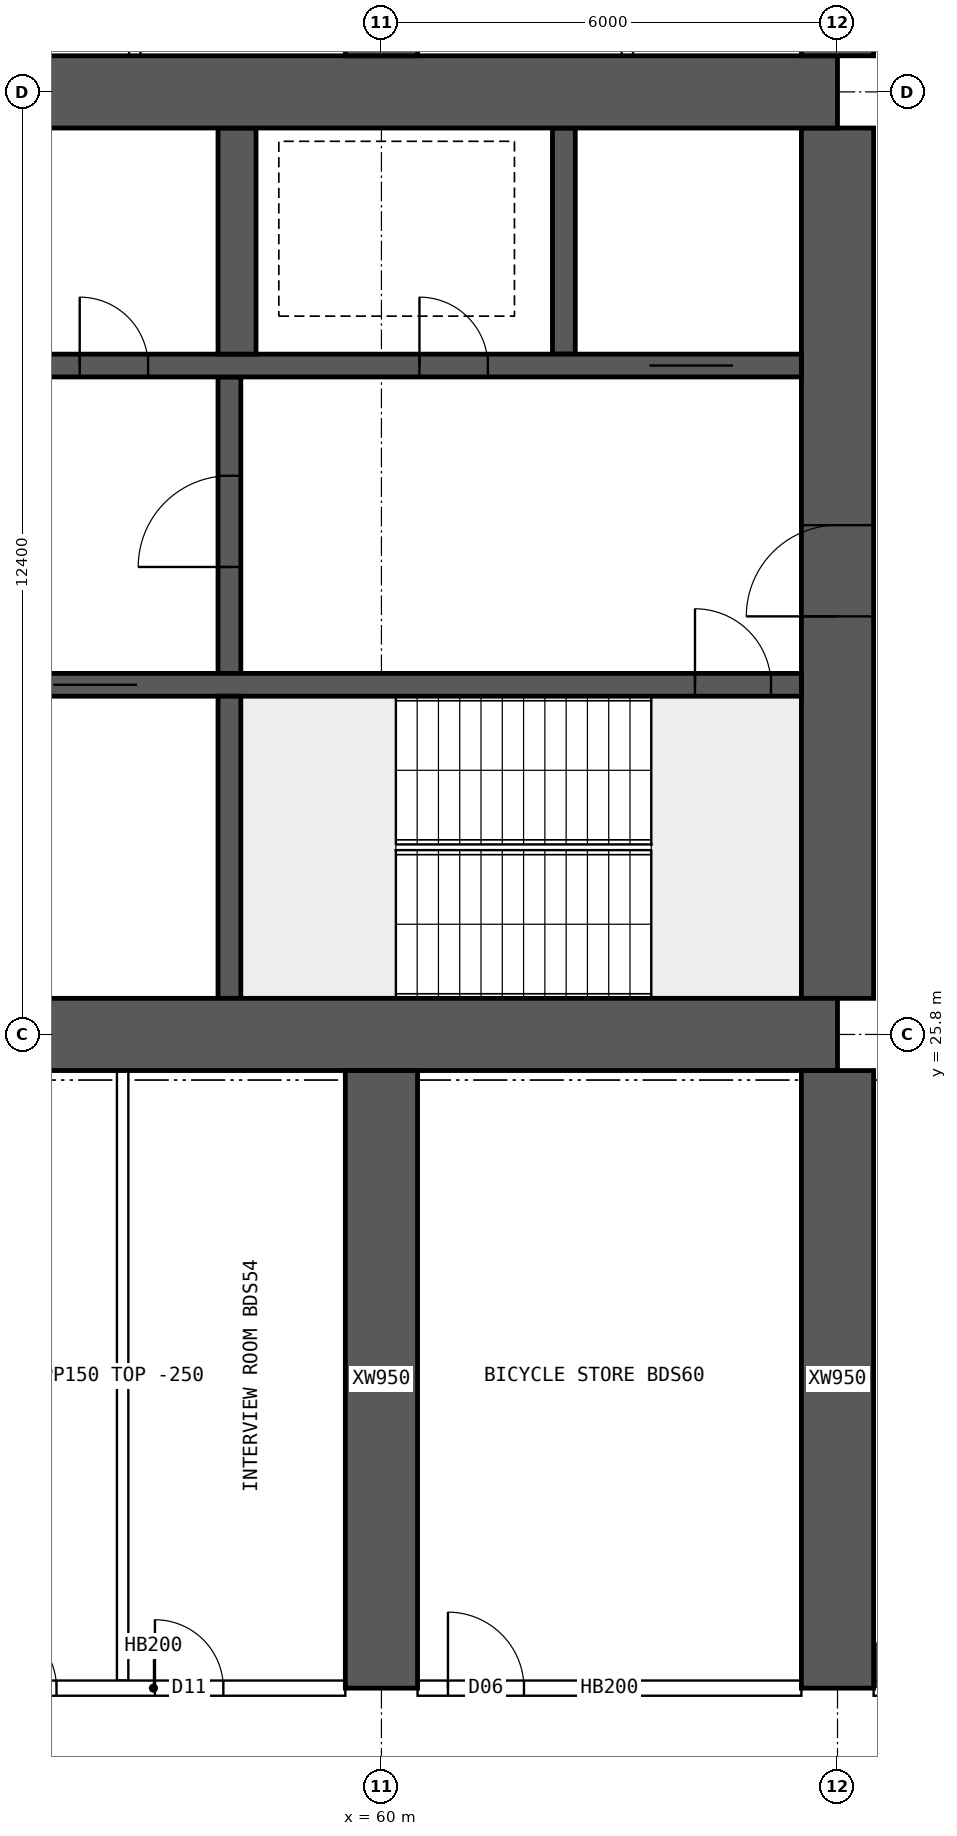
"""IFC4 building model, lengths in metres.
Left out: names, types, materials, properties, quantities, classifications, styles, units other than length and angle.
Written with IfcOpenShell. Run it as: python <this file> out.ifc"""

import sys

from ifc_helpers import new_model, si_unit, direction, frame, frame_2d, origin, place, context, subcontext, project, spatial, rectangle, extrude, element, fill, save


model = new_model("IFC4")
c1 = context("Model", 3, precision=1e-05, world=origin(), true_north=direction((0.0, 1.0)))
c2 = subcontext(c1, "Body", "Model", "MODEL_VIEW")
j1 = project(units=[si_unit("LENGTHUNIT", "METRE"), si_unit("PLANEANGLEUNIT", "RADIAN")], contexts=[c1])
p1 = place(None, origin())
s1 = spatial("IfcSite", under=j1, at=p1, CompositionType="ELEMENT")
p2 = place(p1, origin())
s2 = spatial("IfcBuilding", under=s1, at=p2, CompositionType="ELEMENT")
p3 = place(p2, frame((0.0, 0.0, 140.35)))
s3 = spatial("IfcBuildingStorey", under=s2, at=p3, CompositionType="ELEMENT", Elevation=140.35)
for number, where, z_axis, x_axis in (
    (1, (18.0, 25.8, 0.0), (0.0, 0.0, 1.0), (1.0, 0.0, 0.0)),
    (2, (18.0, 38.2, 0.0), (0.0, 0.0, 1.0), (1.0, 0.0, 0.0)),
):
    element("IfcWall", number, at=place(p3, frame(where, z_axis=z_axis, x_axis=x_axis)), inside=s3, PredefinedType="SHEAR", context=c2, shape_type="SweptSolid", body=[
        extrude(rectangle(XDim=48.0, YDim=0.95, at=frame_2d((24.0, 0.0))), origin(), (0.0, 0.0, 1.0), 4.5),
    ])
p4 = place(p3, frame((66.0, 26.275, 0.0), z_axis=(0.0, 0.0, 1.0), x_axis=(0.0, 1.0, 0.0)))
e3 = element("IfcWall", 3, at=p4, inside=s3, PredefinedType="SHEAR", context=c2, shape_type="SweptSolid", body=[
    extrude(rectangle(XDim=11.45, YDim=0.95, at=frame_2d((5.725, 0.0))), origin(), (0.0, 0.0, 1.0), 4.5),
])
p5 = place(p4, frame((5.025, 0.0, 0.0)))
e4 = element("IfcOpeningElement", 4, at=p5, cuts=e3, PredefinedType="OPENING", context=c2, shape_type="SweptSolid", body=[
    extrude(rectangle(XDim=1.2, YDim=2.1, at=frame_2d((0.6, 1.05))), frame((0.0, 0.485, 0.0), z_axis=(0.0, -1.0, 0.0), x_axis=(1.0, 0.0, 0.0)), (0.0, 0.0, 1.0), 0.97),
])
p6 = place(p3, frame((18.475, 30.4, 0.0), z_axis=(0.0, 0.0, 1.0), x_axis=(1.0, 0.0, 0.0)))
e5 = element("IfcWall", 5, at=p6, inside=s3, PredefinedType="SHEAR", context=c2, shape_type="SweptSolid", body=[
    extrude(rectangle(XDim=47.05, YDim=0.3, at=frame_2d((23.525, 0.0))), origin(), (0.0, 0.0, 1.0), 4.5),
])
p7 = place(p6, frame((0.4, 0.0, 0.0)))
e6 = element("IfcOpeningElement", 6, at=p7, cuts=e5, PredefinedType="OPENING", context=c2, shape_type="SweptSolid", body=[
    extrude(rectangle(XDim=1.0, YDim=2.1, at=frame_2d((0.5, 1.05))), frame((0.0, 0.16, 0.0), z_axis=(0.0, -1.0, 0.0), x_axis=(1.0, 0.0, 0.0)), (0.0, 0.0, 1.0), 0.32),
])
p8 = place(p6, frame((45.65, 0.0, 0.0)))
e7 = element("IfcOpeningElement", 7, at=p8, cuts=e5, PredefinedType="OPENING", context=c2, shape_type="SweptSolid", body=[
    extrude(rectangle(XDim=1.0, YDim=2.1, at=frame_2d((0.5, 1.05))), frame((0.0, 0.16, 0.0), z_axis=(0.0, -1.0, 0.0), x_axis=(1.0, 0.0, 0.0)), (0.0, 0.0, 1.0), 0.32),
])
p9 = place(p6, frame((8.275, 0.0, 0.0)))
e8 = element("IfcOpeningElement", 8, at=p9, cuts=e5, PredefinedType="OPENING", context=c2, shape_type="SweptSolid", body=[
    extrude(rectangle(XDim=1.1, YDim=2.1, at=frame_2d((0.55, 1.05))), frame((0.0, 0.16, 0.0), z_axis=(0.0, -1.0, 0.0), x_axis=(1.0, 0.0, 0.0)), (0.0, 0.0, 1.0), 0.32),
])
p10 = place(p6, frame((10.875, 0.0, 0.0)))
e9 = element("IfcOpeningElement", 9, at=p10, cuts=e5, PredefinedType="OPENING", context=c2, shape_type="SweptSolid", body=[
    extrude(rectangle(XDim=1.1, YDim=2.1, at=frame_2d((0.55, 1.05))), frame((0.0, 0.16, 0.0), z_axis=(0.0, -1.0, 0.0), x_axis=(1.0, 0.0, 0.0)), (0.0, 0.0, 1.0), 0.32),
])
p11 = place(p6, frame((13.475, 0.0, 0.0)))
e10 = element("IfcOpeningElement", 10, at=p11, cuts=e5, PredefinedType="OPENING", context=c2, shape_type="SweptSolid", body=[
    extrude(rectangle(XDim=1.1, YDim=2.1, at=frame_2d((0.55, 1.05))), frame((0.0, 0.16, 0.0), z_axis=(0.0, -1.0, 0.0), x_axis=(1.0, 0.0, 0.0)), (0.0, 0.0, 1.0), 0.32),
])
p12 = place(p6, frame((16.075, 0.0, 0.0)))
e11 = element("IfcOpeningElement", 11, at=p12, cuts=e5, PredefinedType="OPENING", context=c2, shape_type="SweptSolid", body=[
    extrude(rectangle(XDim=1.1, YDim=2.1, at=frame_2d((0.55, 1.05))), frame((0.0, 0.16, 0.0), z_axis=(0.0, -1.0, 0.0), x_axis=(1.0, 0.0, 0.0)), (0.0, 0.0, 1.0), 0.32),
])
p13 = place(p6, frame((18.85, 0.0, 0.0)))
e12 = element("IfcOpeningElement", 12, at=p13, cuts=e5, PredefinedType="OPENING", context=c2, shape_type="SweptSolid", body=[
    extrude(rectangle(XDim=0.9, YDim=2.1, at=frame_2d((0.45, 1.05))), frame((0.0, 0.16, 0.0), z_axis=(0.0, -1.0, 0.0), x_axis=(1.0, 0.0, 0.0)), (0.0, 0.0, 1.0), 0.32),
])
p14 = place(p6, frame((21.5, 0.0, 0.0)))
e13 = element("IfcOpeningElement", 13, at=p14, cuts=e5, PredefinedType="OPENING", context=c2, shape_type="SweptSolid", body=[
    extrude(rectangle(XDim=1.1, YDim=2.1, at=frame_2d((0.55, 1.05))), frame((0.0, 0.16, 0.0), z_axis=(0.0, -1.0, 0.0), x_axis=(1.0, 0.0, 0.0)), (0.0, 0.0, 1.0), 0.32),
])
p15 = place(p6, frame((30.142, 0.0, 0.0)))
e14 = element("IfcOpeningElement", 14, at=p15, cuts=e5, PredefinedType="OPENING", context=c2, shape_type="SweptSolid", body=[
    extrude(rectangle(XDim=1.1, YDim=2.1, at=frame_2d((0.55, 1.05))), frame((0.0, 0.16, 0.0), z_axis=(0.0, -1.0, 0.0), x_axis=(1.0, 0.0, 0.0)), (0.0, 0.0, 1.0), 0.32),
])
p16 = place(p6, frame((33.675, 0.0, 0.0)))
e15 = element("IfcOpeningElement", 15, at=p16, cuts=e5, PredefinedType="OPENING", context=c2, shape_type="SweptSolid", body=[
    extrude(rectangle(XDim=1.1, YDim=2.1, at=frame_2d((0.55, 1.05))), frame((0.0, 0.16, 0.0), z_axis=(0.0, -1.0, 0.0), x_axis=(1.0, 0.0, 0.0)), (0.0, 0.0, 1.0), 0.32),
])
p17 = place(p6, frame((37.208, 0.0, 0.0)))
e16 = element("IfcOpeningElement", 16, at=p17, cuts=e5, PredefinedType="OPENING", context=c2, shape_type="SweptSolid", body=[
    extrude(rectangle(XDim=1.1, YDim=2.1, at=frame_2d((0.55, 1.05))), frame((0.0, 0.16, 0.0), z_axis=(0.0, -1.0, 0.0), x_axis=(1.0, 0.0, 0.0)), (0.0, 0.0, 1.0), 0.32),
])
p18 = place(p3, frame((18.475, 34.6, 0.0), z_axis=(0.0, 0.0, 1.0), x_axis=(1.0, 0.0, 0.0)))
e17 = element("IfcWall", 17, at=p18, inside=s3, PredefinedType="SHEAR", context=c2, shape_type="SweptSolid", body=[
    extrude(rectangle(XDim=47.05, YDim=0.3, at=frame_2d((23.525, 0.0))), origin(), (0.0, 0.0, 1.0), 4.5),
])
p19 = place(p18, frame((0.9, 0.0, 0.0)))
e18 = element("IfcOpeningElement", 18, at=p19, cuts=e17, PredefinedType="OPENING", context=c2, shape_type="SweptSolid", body=[
    extrude(rectangle(XDim=1.1, YDim=2.1, at=frame_2d((0.55, 1.05))), frame((0.0, 0.16, 0.0), z_axis=(0.0, -1.0, 0.0), x_axis=(1.0, 0.0, 0.0)), (0.0, 0.0, 1.0), 0.32),
])
p20 = place(p18, frame((45.05, 0.0, 0.0)))
e19 = element("IfcOpeningElement", 19, at=p20, cuts=e17, PredefinedType="OPENING", context=c2, shape_type="SweptSolid", body=[
    extrude(rectangle(XDim=1.1, YDim=2.1, at=frame_2d((0.55, 1.05))), frame((0.0, 0.16, 0.0), z_axis=(0.0, -1.0, 0.0), x_axis=(1.0, 0.0, 0.0)), (0.0, 0.0, 1.0), 0.32),
])
p21 = place(p18, frame((4.125, 0.0, 0.0)))
e20 = element("IfcOpeningElement", 20, at=p21, cuts=e17, PredefinedType="OPENING", context=c2, shape_type="SweptSolid", body=[
    extrude(rectangle(XDim=0.9, YDim=2.1, at=frame_2d((0.45, 1.05))), frame((0.0, 0.16, 0.0), z_axis=(0.0, -1.0, 0.0), x_axis=(1.0, 0.0, 0.0)), (0.0, 0.0, 1.0), 0.32),
])
p22 = place(p18, frame((42.025, 0.0, 0.0)))
e21 = element("IfcOpeningElement", 21, at=p22, cuts=e17, PredefinedType="OPENING", context=c2, shape_type="SweptSolid", body=[
    extrude(rectangle(XDim=0.9, YDim=2.1, at=frame_2d((0.45, 1.05))), frame((0.0, 0.16, 0.0), z_axis=(0.0, -1.0, 0.0), x_axis=(1.0, 0.0, 0.0)), (0.0, 0.0, 1.0), 0.32),
])
p23 = place(p18, frame((8.9, 0.0, 0.0)))
e22 = element("IfcOpeningElement", 22, at=p23, cuts=e17, PredefinedType="OPENING", context=c2, shape_type="SweptSolid", body=[
    extrude(rectangle(XDim=0.9, YDim=2.1, at=frame_2d((0.45, 1.05))), frame((0.0, 0.16, 0.0), z_axis=(0.0, -1.0, 0.0), x_axis=(1.0, 0.0, 0.0)), (0.0, 0.0, 1.0), 0.32),
])
p24 = place(p18, frame((12.874, 0.0, 0.0)))
e23 = element("IfcOpeningElement", 23, at=p24, cuts=e17, PredefinedType="OPENING", context=c2, shape_type="SweptSolid", body=[
    extrude(rectangle(XDim=0.9, YDim=2.1, at=frame_2d((0.45, 1.05))), frame((0.0, 0.16, 0.0), z_axis=(0.0, -1.0, 0.0), x_axis=(1.0, 0.0, 0.0)), (0.0, 0.0, 1.0), 0.32),
])
p25 = place(p18, frame((16.521, 0.0, 0.0)))
e24 = element("IfcOpeningElement", 24, at=p25, cuts=e17, PredefinedType="OPENING", context=c2, shape_type="SweptSolid", body=[
    extrude(rectangle(XDim=0.9, YDim=2.1, at=frame_2d((0.45, 1.05))), frame((0.0, 0.16, 0.0), z_axis=(0.0, -1.0, 0.0), x_axis=(1.0, 0.0, 0.0)), (0.0, 0.0, 1.0), 0.32),
])
p26 = place(p18, frame((20.28, 0.0, 0.0)))
e25 = element("IfcOpeningElement", 25, at=p26, cuts=e17, PredefinedType="OPENING", context=c2, shape_type="SweptSolid", body=[
    extrude(rectangle(XDim=0.9, YDim=2.1, at=frame_2d((0.45, 1.05))), frame((0.0, 0.16, 0.0), z_axis=(0.0, -1.0, 0.0), x_axis=(1.0, 0.0, 0.0)), (0.0, 0.0, 1.0), 0.32),
])
p27 = place(p18, frame((24.686, 0.0, 0.0)))
e26 = element("IfcOpeningElement", 26, at=p27, cuts=e17, PredefinedType="OPENING", context=c2, shape_type="SweptSolid", body=[
    extrude(rectangle(XDim=0.9, YDim=2.1, at=frame_2d((0.45, 1.05))), frame((0.0, 0.16, 0.0), z_axis=(0.0, -1.0, 0.0), x_axis=(1.0, 0.0, 0.0)), (0.0, 0.0, 1.0), 0.32),
])
p28 = place(p18, frame((27.483, 0.0, 0.0)))
e27 = element("IfcOpeningElement", 27, at=p28, cuts=e17, PredefinedType="OPENING", context=c2, shape_type="SweptSolid", body=[
    extrude(rectangle(XDim=0.9, YDim=2.1, at=frame_2d((0.45, 1.05))), frame((0.0, 0.16, 0.0), z_axis=(0.0, -1.0, 0.0), x_axis=(1.0, 0.0, 0.0)), (0.0, 0.0, 1.0), 0.32),
])
p29 = place(p18, frame((30.666, 0.0, 0.0)))
e28 = element("IfcOpeningElement", 28, at=p29, cuts=e17, PredefinedType="OPENING", context=c2, shape_type="SweptSolid", body=[
    extrude(rectangle(XDim=0.9, YDim=2.1, at=frame_2d((0.45, 1.05))), frame((0.0, 0.16, 0.0), z_axis=(0.0, -1.0, 0.0), x_axis=(1.0, 0.0, 0.0)), (0.0, 0.0, 1.0), 0.32),
])
p30 = place(p18, frame((34.617, 0.0, 0.0)))
e29 = element("IfcOpeningElement", 29, at=p30, cuts=e17, PredefinedType="OPENING", context=c2, shape_type="SweptSolid", body=[
    extrude(rectangle(XDim=0.9, YDim=2.1, at=frame_2d((0.45, 1.05))), frame((0.0, 0.16, 0.0), z_axis=(0.0, -1.0, 0.0), x_axis=(1.0, 0.0, 0.0)), (0.0, 0.0, 1.0), 0.32),
])
p31 = place(p18, frame((37.555, 0.0, 0.0)))
e30 = element("IfcOpeningElement", 30, at=p31, cuts=e17, PredefinedType="OPENING", context=c2, shape_type="SweptSolid", body=[
    extrude(rectangle(XDim=0.9, YDim=2.1, at=frame_2d((0.45, 1.05))), frame((0.0, 0.16, 0.0), z_axis=(0.0, -1.0, 0.0), x_axis=(1.0, 0.0, 0.0)), (0.0, 0.0, 1.0), 0.32),
])
p32 = place(p3, frame((58.0, 26.275, 0.0), z_axis=(0.0, 0.0, 1.0), x_axis=(0.0, 1.0, 0.0)))
e31 = element("IfcWall", 31, at=p32, inside=s3, PredefinedType="SHEAR", context=c2, shape_type="SweptSolid", body=[
    extrude(rectangle(XDim=3.975, YDim=0.3, at=frame_2d((1.988, 0.0))), origin(), (0.0, 0.0, 1.0), 4.5),
])
p33 = place(p3, frame((58.0, 30.55, 0.0), z_axis=(0.0, 0.0, 1.0), x_axis=(0.0, 1.0, 0.0)))
e32 = element("IfcWall", 32, at=p33, inside=s3, PredefinedType="SHEAR", context=c2, shape_type="SweptSolid", body=[
    extrude(rectangle(XDim=3.9, YDim=0.3, at=frame_2d((1.95, 0.0))), origin(), (0.0, 0.0, 1.0), 4.5),
])
p34 = place(p33, frame((1.4, 0.0, 0.0)))
e33 = element("IfcOpeningElement", 33, at=p34, cuts=e32, PredefinedType="OPENING", context=c2, shape_type="SweptSolid", body=[
    extrude(rectangle(XDim=1.2, YDim=2.1, at=frame_2d((0.6, 1.05))), frame((0.0, 0.16, 0.0), z_axis=(0.0, -1.0, 0.0), x_axis=(1.0, 0.0, 0.0)), (0.0, 0.0, 1.0), 0.32),
])
p35 = place(p3, frame((62.4, 34.75, 0.0), z_axis=(0.0, 0.0, 1.0), x_axis=(0.0, 1.0, 0.0)))
e34 = element("IfcWall", 34, at=p35, inside=s3, PredefinedType="SHEAR", context=c2, shape_type="SweptSolid", body=[
    extrude(rectangle(XDim=2.975, YDim=0.3, at=frame_2d((1.488, 0.0))), origin(), (0.0, 0.0, 1.0), 4.5),
])
p36 = place(p3, frame((58.1, 34.75, 0.0), z_axis=(0.0, 0.0, 1.0), x_axis=(0.0, 1.0, 0.0)))
e35 = element("IfcWall", 35, at=p36, inside=s3, PredefinedType="SHEAR", context=c2, shape_type="SweptSolid", body=[
    extrude(rectangle(XDim=2.975, YDim=0.5, at=frame_2d((1.488, 0.0))), origin(), (0.0, 0.0, 1.0), 4.5),
])
for number, where, z_axis, x_axis in (
    (36, (60.0, 17.2, 0.0), (0.0, 0.0, 1.0), (0.0, 1.0, 0.0)),
    (37, (60.0, 38.675, 0.0), (0.0, 0.0, 1.0), (0.0, 1.0, 0.0)),
    (38, (66.0, 17.2, 0.0), (0.0, 0.0, 1.0), (0.0, 1.0, 0.0)),
    (39, (66.0, 38.675, 0.0), (0.0, 0.0, 1.0), (0.0, 1.0, 0.0)),
):
    element("IfcWall", number, at=place(p3, frame(where, z_axis=z_axis, x_axis=x_axis)), inside=s3, PredefinedType="SHEAR", context=c2, shape_type="SweptSolid", body=[
        extrude(rectangle(XDim=8.125, YDim=0.95, at=frame_2d((4.062, 0.0))), origin(), (0.0, 0.0, 1.0), 4.5),
    ])
p37 = place(p3, frame((54.475, 17.2, 0.0), z_axis=(0.0, 0.0, 1.0), x_axis=(1.0, 0.0, 0.0)))
e40 = element("IfcWall", 40, at=p37, inside=s3, PredefinedType="SOLIDWALL", context=c2, shape_type="SweptSolid", body=[
    extrude(rectangle(XDim=5.05, YDim=0.2, at=frame_2d((2.525, 0.0))), origin(), (0.0, 0.0, 1.0), 4.25),
])
p38 = place(p37, frame((0.35, 0.0, 0.0)))
e41 = element("IfcOpeningElement", 41, at=p38, cuts=e40, PredefinedType="OPENING", context=c2, shape_type="SweptSolid", body=[
    extrude(rectangle(XDim=0.9, YDim=2.1, at=frame_2d((0.45, 1.05))), frame((0.0, 0.11, 0.0), z_axis=(0.0, -1.0, 0.0), x_axis=(1.0, 0.0, 0.0)), (0.0, 0.0, 1.0), 0.22),
])
p39 = place(p37, frame((2.545, 0.0, 0.0)))
e42 = element("IfcOpeningElement", 42, at=p39, cuts=e40, PredefinedType="OPENING", context=c2, shape_type="SweptSolid", body=[
    extrude(rectangle(XDim=0.9, YDim=2.1, at=frame_2d((0.45, 1.05))), frame((0.0, 0.11, 0.0), z_axis=(0.0, -1.0, 0.0), x_axis=(1.0, 0.0, 0.0)), (0.0, 0.0, 1.0), 0.22),
])
p40 = place(p3, frame((60.475, 17.2, 0.0), z_axis=(0.0, 0.0, 1.0), x_axis=(1.0, 0.0, 0.0)))
e43 = element("IfcWall", 43, at=p40, inside=s3, PredefinedType="SOLIDWALL", context=c2, shape_type="SweptSolid", body=[
    extrude(rectangle(XDim=5.05, YDim=0.2, at=frame_2d((2.525, 0.0))), origin(), (0.0, 0.0, 1.0), 4.25),
])
p41 = place(p40, frame((0.4, 0.0, 0.0)))
e44 = element("IfcOpeningElement", 44, at=p41, cuts=e43, PredefinedType="OPENING", context=c2, shape_type="SweptSolid", body=[
    extrude(rectangle(XDim=1.0, YDim=2.1, at=frame_2d((0.5, 1.05))), frame((0.0, 0.11, 0.0), z_axis=(0.0, -1.0, 0.0), x_axis=(1.0, 0.0, 0.0)), (0.0, 0.0, 1.0), 0.22),
])
p42 = place(p3, frame((66.475, 17.2, 0.0), z_axis=(0.0, 0.0, 1.0), x_axis=(1.0, 0.0, 0.0)))
e45 = element("IfcWall", 45, at=p42, inside=s3, PredefinedType="SOLIDWALL", context=c2, shape_type="SweptSolid", body=[
    extrude(rectangle(XDim=1.925, YDim=0.2, at=frame_2d((0.962, 0.0))), origin(), (0.0, 0.0, 1.0), 4.25),
])
p43 = place(p42, frame((0.05, 0.0, 0.0)))
e46 = element("IfcOpeningElement", 46, at=p43, cuts=e45, PredefinedType="OPENING", context=c2, shape_type="SweptSolid", body=[
    extrude(rectangle(XDim=1.2, YDim=2.1, at=frame_2d((0.6, 1.05))), frame((0.0, 0.11, 0.0), z_axis=(0.0, -1.0, 0.0), x_axis=(1.0, 0.0, 0.0)), (0.0, 0.0, 1.0), 0.22),
])
for number, where, z_axis, x_axis in (
    (47, (56.595, 17.3, 0.0), (0.0, 0.0, 1.0), (0.0, 1.0, 0.0)),
    (48, (56.755, 38.675, 0.0), (0.0, 0.0, 1.0), (0.0, 1.0, 0.0)),
    (49, (63.235, 38.675, 0.0), (0.0, 0.0, 1.0), (0.0, 1.0, 0.0)),
):
    element("IfcWall", number, at=place(p3, frame(where, z_axis=z_axis, x_axis=x_axis)), inside=s3, PredefinedType="PARTITIONING", context=c2, shape_type="SweptSolid", body=[
        extrude(rectangle(XDim=8.025, YDim=0.15, at=frame_2d((4.012, 0.0))), origin(), (0.0, 0.0, 1.0), 4.25),
    ])
p44 = place(p5, origin())
e50 = element("IfcDoor", 50, at=p44, inside=s3, OperationType="SINGLE_SWING_LEFT", PredefinedType="DOOR", context=c2, shape_type="SweptSolid", body=[
    extrude(rectangle(XDim=1.2, YDim=2.1, at=frame_2d((0.6, 1.05))), frame((0.0, 0.025, 0.0), z_axis=(0.0, -1.0, 0.0), x_axis=(1.0, 0.0, 0.0)), (0.0, 0.0, 1.0), 0.05),
])
fill(e4, e50)
p45 = place(p8, origin())
e51 = element("IfcDoor", 51, at=p45, inside=s3, OperationType="SINGLE_SWING_LEFT", PredefinedType="DOOR", context=c2, shape_type="SweptSolid", body=[
    extrude(rectangle(XDim=1.0, YDim=2.1, at=frame_2d((0.5, 1.05))), frame((0.0, 0.025, 0.0), z_axis=(0.0, -1.0, 0.0), x_axis=(1.0, 0.0, 0.0)), (0.0, 0.0, 1.0), 0.05),
])
fill(e7, e51)
p46 = place(p20, origin())
e52 = element("IfcDoor", 52, at=p46, inside=s3, OperationType="DOUBLE_DOOR_SLIDING", PredefinedType="DOOR", context=c2, shape_type="SweptSolid", body=[
    extrude(rectangle(XDim=1.1, YDim=2.1, at=frame_2d((0.55, 1.05))), frame((0.0, 0.025, 0.0), z_axis=(0.0, -1.0, 0.0), x_axis=(1.0, 0.0, 0.0)), (0.0, 0.0, 1.0), 0.05),
])
fill(e19, e52)
p47 = place(p22, origin())
e53 = element("IfcDoor", 53, at=p47, inside=s3, OperationType="SINGLE_SWING_LEFT", PredefinedType="DOOR", context=c2, shape_type="SweptSolid", body=[
    extrude(rectangle(XDim=0.9, YDim=2.1, at=frame_2d((0.45, 1.05))), frame((0.0, 0.025, 0.0), z_axis=(0.0, -1.0, 0.0), x_axis=(1.0, 0.0, 0.0)), (0.0, 0.0, 1.0), 0.05),
])
fill(e21, e53)
p48 = place(p34, origin())
e54 = element("IfcDoor", 54, at=p48, inside=s3, OperationType="SINGLE_SWING_LEFT", PredefinedType="DOOR", context=c2, shape_type="SweptSolid", body=[
    extrude(rectangle(XDim=1.2, YDim=2.1, at=frame_2d((0.6, 1.05))), frame((0.0, 0.025, 0.0), z_axis=(0.0, -1.0, 0.0), x_axis=(1.0, 0.0, 0.0)), (0.0, 0.0, 1.0), 0.05),
])
fill(e33, e54)
p49 = place(p31, origin())
e55 = element("IfcDoor", 55, at=p49, inside=s3, OperationType="SINGLE_SWING_LEFT", PredefinedType="DOOR", context=c2, shape_type="SweptSolid", body=[
    extrude(rectangle(XDim=0.9, YDim=2.1, at=frame_2d((0.45, 1.05))), frame((0.0, 0.025, 0.0), z_axis=(0.0, -1.0, 0.0), x_axis=(1.0, 0.0, 0.0)), (0.0, 0.0, 1.0), 0.05),
])
fill(e30, e55)
p50 = place(p17, origin())
e56 = element("IfcDoor", 56, at=p50, inside=s3, OperationType="DOUBLE_DOOR_SLIDING", PredefinedType="DOOR", context=c2, shape_type="SweptSolid", body=[
    extrude(rectangle(XDim=1.1, YDim=2.1, at=frame_2d((0.55, 1.05))), frame((0.0, 0.025, 0.0), z_axis=(0.0, -1.0, 0.0), x_axis=(1.0, 0.0, 0.0)), (0.0, 0.0, 1.0), 0.05),
])
fill(e16, e56)
p51 = place(p38, origin())
e57 = element("IfcDoor", 57, at=p51, inside=s3, OperationType="SINGLE_SWING_LEFT", PredefinedType="DOOR", context=c2, shape_type="SweptSolid", body=[
    extrude(rectangle(XDim=0.9, YDim=2.1, at=frame_2d((0.45, 1.05))), frame((0.0, 0.025, 0.0), z_axis=(0.0, -1.0, 0.0), x_axis=(1.0, 0.0, 0.0)), (0.0, 0.0, 1.0), 0.05),
])
fill(e41, e57)
p52 = place(p39, origin())
e58 = element("IfcDoor", 58, at=p52, inside=s3, OperationType="SINGLE_SWING_LEFT", PredefinedType="DOOR", context=c2, shape_type="SweptSolid", body=[
    extrude(rectangle(XDim=0.9, YDim=2.1, at=frame_2d((0.45, 1.05))), frame((0.0, 0.025, 0.0), z_axis=(0.0, -1.0, 0.0), x_axis=(1.0, 0.0, 0.0)), (0.0, 0.0, 1.0), 0.05),
])
fill(e42, e58)
p53 = place(p41, origin())
e59 = element("IfcDoor", 59, at=p53, inside=s3, OperationType="SINGLE_SWING_LEFT", PredefinedType="DOOR", context=c2, shape_type="SweptSolid", body=[
    extrude(rectangle(XDim=1.0, YDim=2.1, at=frame_2d((0.5, 1.05))), frame((0.0, 0.025, 0.0), z_axis=(0.0, -1.0, 0.0), x_axis=(1.0, 0.0, 0.0)), (0.0, 0.0, 1.0), 0.05),
])
fill(e44, e59)
save(model, sys.argv[1])
